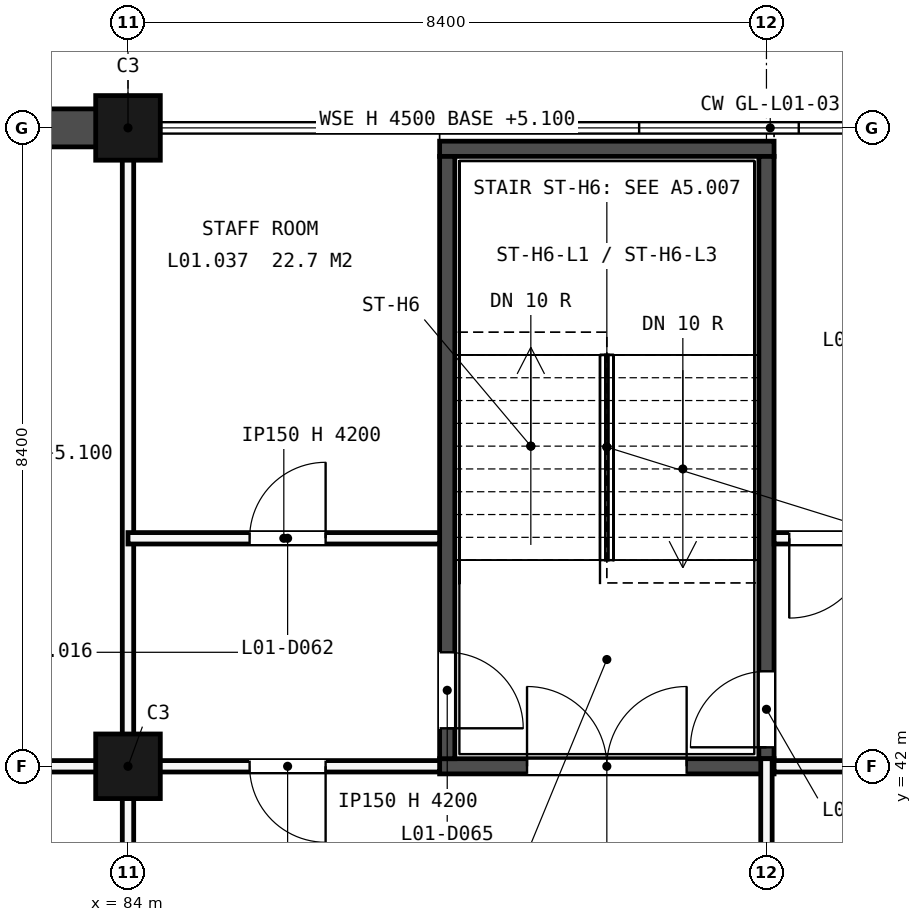
"""IFC4 building model, lengths in metres.
Left out: names, types, materials, properties, quantities, classifications, styles, units other than length and angle.
Written with IfcOpenShell. Run it as: python <this file> out.ifc"""

import sys

from ifc_helpers import new_model, si_unit, direction, frame, frame_2d, origin, origin_2d, place, context, subcontext, project, spatial, rectangle, extrude, element, fill, save


model = new_model("IFC4")
c1 = context("Model", 3, precision=1e-05, world=origin(), true_north=direction((0.0, 1.0)))
c2 = subcontext(c1, "Body", "Model", "MODEL_VIEW")
j1 = project(units=[si_unit("LENGTHUNIT", "METRE"), si_unit("PLANEANGLEUNIT", "RADIAN")], contexts=[c1])
p1 = place(None, origin())
s1 = spatial("IfcSite", under=j1, at=p1, CompositionType="ELEMENT")
p2 = place(p1, origin())
s2 = spatial("IfcBuilding", under=s1, at=p2, CompositionType="ELEMENT")
p3 = place(p2, frame((0.0, 0.0, 5.4)))
s3 = spatial("IfcBuildingStorey", under=s2, at=p3, CompositionType="ELEMENT", Elevation=5.4)
for number, where, z_axis, x_axis in (
    (1, (84.0, 42.0, -0.3), (0.0, 0.0, 1.0), (1.0, 0.0, 0.0)),
    (2, (84.0, 50.4, -0.3), (0.0, 0.0, 1.0), (1.0, 0.0, 0.0)),
):
    element("IfcColumn", number, at=place(p3, frame(where, z_axis=z_axis, x_axis=x_axis)), inside=s3, PredefinedType="COLUMN", context=c2, shape_type="SweptSolid", body=[
        extrude(rectangle(XDim=0.85, YDim=0.85, at=origin_2d()), origin(), (0.0, 0.0, 1.0), 4.55),
    ])
p4 = place(p3, frame((42.0, 50.4, -0.3), z_axis=(0.0, 0.0, 1.0), x_axis=(1.0, 0.0, 0.0)))
e3 = element("IfcWall", 3, at=p4, inside=s3, PredefinedType="SHEAR", context=c2, shape_type="SweptSolid", body=[
    extrude(rectangle(XDim=42.0, YDim=0.5, at=frame_2d((21.0, 0.0))), origin(), (0.0, 0.0, 1.0), 4.55),
])
p5 = place(p3, frame((88.1, 42.0, -0.3), z_axis=(0.0, 0.0, 1.0), x_axis=(1.0, 0.0, 0.0)))
e4 = element("IfcWall", 4, at=p5, inside=s3, PredefinedType="SHEAR", context=c2, shape_type="SweptSolid", body=[
    extrude(rectangle(XDim=4.4, YDim=0.2, at=frame_2d((2.2, 0.0))), origin(), (0.0, 0.0, 1.0), 4.5),
])
p6 = place(p5, frame((1.15, 0.0, 0.3)))
e5 = element("IfcOpeningElement", 5, at=p6, cuts=e4, PredefinedType="OPENING", context=c2, shape_type="SweptSolid", body=[
    extrude(rectangle(XDim=2.1, YDim=2.1, at=frame_2d((1.05, 1.05))), frame((0.0, 0.11, 0.0), z_axis=(0.0, -1.0, 0.0), x_axis=(1.0, 0.0, 0.0)), (0.0, 0.0, 1.0), 0.22),
])
p7 = place(p3, frame((88.1, 50.125, -0.3), z_axis=(0.0, 0.0, 1.0), x_axis=(1.0, 0.0, 0.0)))
e6 = element("IfcWall", 6, at=p7, inside=s3, PredefinedType="SHEAR", context=c2, shape_type="SweptSolid", body=[
    extrude(rectangle(XDim=4.4, YDim=0.2, at=frame_2d((2.2, 0.0))), origin(), (0.0, 0.0, 1.0), 4.5),
])
p8 = place(p3, frame((88.2, 42.1, -0.3), z_axis=(0.0, 0.0, 1.0), x_axis=(0.0, 1.0, 0.0)))
e7 = element("IfcWall", 7, at=p8, inside=s3, PredefinedType="SHEAR", context=c2, shape_type="SweptSolid", body=[
    extrude(rectangle(XDim=7.925, YDim=0.2, at=frame_2d((3.962, 0.0))), origin(), (0.0, 0.0, 1.0), 4.5),
])
p9 = place(p8, frame((0.4, 0.0, 0.3)))
e8 = element("IfcOpeningElement", 8, at=p9, cuts=e7, PredefinedType="OPENING", context=c2, shape_type="SweptSolid", body=[
    extrude(rectangle(XDim=1.0, YDim=2.1, at=frame_2d((0.5, 1.05))), frame((0.0, 0.11, 0.0), z_axis=(0.0, -1.0, 0.0), x_axis=(1.0, 0.0, 0.0)), (0.0, 0.0, 1.0), 0.22),
])
p10 = place(p3, frame((92.4, 42.1, -0.3), z_axis=(0.0, 0.0, 1.0), x_axis=(0.0, 1.0, 0.0)))
e9 = element("IfcWall", 9, at=p10, inside=s3, PredefinedType="SHEAR", context=c2, shape_type="SweptSolid", body=[
    extrude(rectangle(XDim=7.925, YDim=0.2, at=frame_2d((3.962, 0.0))), origin(), (0.0, 0.0, 1.0), 4.5),
])
p11 = place(p10, frame((0.15, 0.0, 0.3)))
e10 = element("IfcOpeningElement", 10, at=p11, cuts=e9, PredefinedType="OPENING", context=c2, shape_type="SweptSolid", body=[
    extrude(rectangle(XDim=1.0, YDim=2.1, at=frame_2d((0.5, 1.05))), frame((0.0, 0.11, 0.0), z_axis=(0.0, -1.0, 0.0), x_axis=(1.0, 0.0, 0.0)), (0.0, 0.0, 1.0), 0.22),
])
p12 = place(p3, frame((42.1, 42.0, -0.3), z_axis=(0.0, 0.0, 1.0), x_axis=(1.0, 0.0, 0.0)))
e11 = element("IfcWall", 11, at=p12, inside=s3, PredefinedType="PARTITIONING", context=c2, shape_type="SweptSolid", body=[
    extrude(rectangle(XDim=41.9, YDim=0.15, at=frame_2d((20.95, 0.0))), origin(), (0.0, 0.0, 1.0), 4.5),
])
p13 = place(p3, frame((84.0, 42.075, -0.3), z_axis=(0.0, 0.0, 1.0), x_axis=(0.0, 1.0, 0.0)))
e12 = element("IfcWall", 12, at=p13, inside=s3, PredefinedType="PARTITIONING", context=c2, shape_type="SweptSolid", body=[
    extrude(rectangle(XDim=8.075, YDim=0.15, at=frame_2d((4.038, 0.0))), origin(), (0.0, 0.0, 1.0), 3.9),
])
p14 = place(p3, frame((83.925, 42.0, 0.0), z_axis=(0.0, 0.0, 1.0), x_axis=(1.0, 0.0, 0.0)))
e13 = element("IfcWall", 13, at=p14, inside=s3, PredefinedType="PARTITIONING", context=c2, shape_type="SweptSolid", body=[
    extrude(rectangle(XDim=4.175, YDim=0.15, at=frame_2d((2.087, 0.0))), origin(), (0.0, 0.0, 1.0), 4.2),
])
p15 = place(p14, frame((1.675, 0.0, 0.0)))
e14 = element("IfcOpeningElement", 14, at=p15, cuts=e13, PredefinedType="OPENING", context=c2, shape_type="SweptSolid", body=[
    extrude(rectangle(XDim=1.0, YDim=2.1, at=frame_2d((0.5, 1.05))), frame((0.0, 0.085, 0.0), z_axis=(0.0, -1.0, 0.0), x_axis=(1.0, 0.0, 0.0)), (0.0, 0.0, 1.0), 0.17),
])
p16 = place(p3, frame((92.5, 42.0, 0.0), z_axis=(0.0, 0.0, 1.0), x_axis=(1.0, 0.0, 0.0)))
e15 = element("IfcWall", 15, at=p16, inside=s3, PredefinedType="PARTITIONING", context=c2, shape_type="SweptSolid", body=[
    extrude(rectangle(XDim=8.605, YDim=0.15, at=frame_2d((4.302, 0.0))), origin(), (0.0, 0.0, 1.0), 4.2),
])
p17 = place(p3, frame((84.0, 45.0, 0.0), z_axis=(0.0, 0.0, 1.0), x_axis=(1.0, 0.0, 0.0)))
e16 = element("IfcWall", 16, at=p17, inside=s3, PredefinedType="PARTITIONING", context=c2, shape_type="SweptSolid", body=[
    extrude(rectangle(XDim=4.1, YDim=0.15, at=frame_2d((2.05, 0.0))), origin(), (0.0, 0.0, 1.0), 4.2),
])
p18 = place(p17, frame((1.6, 0.0, 0.0)))
e17 = element("IfcOpeningElement", 17, at=p18, cuts=e16, PredefinedType="OPENING", context=c2, shape_type="SweptSolid", body=[
    extrude(rectangle(XDim=1.0, YDim=2.1, at=frame_2d((0.5, 1.05))), frame((0.0, 0.085, 0.0), z_axis=(0.0, -1.0, 0.0), x_axis=(1.0, 0.0, 0.0)), (0.0, 0.0, 1.0), 0.17),
])
p19 = place(p3, frame((92.5, 45.0, 0.0), z_axis=(0.0, 0.0, 1.0), x_axis=(1.0, 0.0, 0.0)))
e18 = element("IfcWall", 18, at=p19, inside=s3, PredefinedType="PARTITIONING", context=c2, shape_type="SweptSolid", body=[
    extrude(rectangle(XDim=20.8, YDim=0.15, at=frame_2d((10.4, 0.0))), origin(), (0.0, 0.0, 1.0), 4.2),
])
p20 = place(p19, frame((0.2, 0.0, 0.0)))
e19 = element("IfcOpeningElement", 19, at=p20, cuts=e18, PredefinedType="OPENING", context=c2, shape_type="SweptSolid", body=[
    extrude(rectangle(XDim=2.1, YDim=2.25, at=frame_2d((1.05, 1.125))), frame((0.0, 0.085, 0.0), z_axis=(0.0, -1.0, 0.0), x_axis=(1.0, 0.0, 0.0)), (0.0, 0.0, 1.0), 0.17),
])
p21 = place(p19, frame((18.5, 0.0, 0.0)))
e20 = element("IfcOpeningElement", 20, at=p21, cuts=e18, PredefinedType="OPENING", context=c2, shape_type="SweptSolid", body=[
    extrude(rectangle(XDim=2.1, YDim=2.25, at=frame_2d((1.05, 1.125))), frame((0.0, 0.085, 0.0), z_axis=(0.0, -1.0, 0.0), x_axis=(1.0, 0.0, 0.0)), (0.0, 0.0, 1.0), 0.17),
])
p22 = place(p3, frame((84.0, 37.8, 0.0), z_axis=(0.0, 0.0, 1.0), x_axis=(0.0, 1.0, 0.0)))
e21 = element("IfcWall", 21, at=p22, inside=s3, PredefinedType="PARTITIONING", context=c2, shape_type="SweptSolid", body=[
    extrude(rectangle(XDim=4.125, YDim=0.15, at=frame_2d((2.062, 0.0))), origin(), (0.0, 0.0, 1.0), 3.6),
])
p23 = place(p22, frame((1.4, 0.0, 0.0)))
e22 = element("IfcOpeningElement", 22, at=p23, cuts=e21, PredefinedType="OPENING", context=c2, shape_type="SweptSolid", body=[
    extrude(rectangle(XDim=1.0, YDim=2.1, at=frame_2d((0.5, 1.05))), frame((0.0, 0.085, 0.0), z_axis=(0.0, -1.0, 0.0), x_axis=(1.0, 0.0, 0.0)), (0.0, 0.0, 1.0), 0.17),
])
p24 = place(p3, frame((92.4, 33.295, 0.0), z_axis=(0.0, 0.0, 1.0), x_axis=(0.0, 1.0, 0.0)))
e23 = element("IfcWall", 23, at=p24, inside=s3, PredefinedType="PARTITIONING", context=c2, shape_type="SweptSolid", body=[
    extrude(rectangle(XDim=8.805, YDim=0.15, at=frame_2d((4.403, 0.0))), origin(), (0.0, 0.0, 1.0), 4.2),
])
p25 = place(p6, origin())
e24 = element("IfcDoor", 24, at=p25, inside=s3, OperationType="DOUBLE_DOOR_SINGLE_SWING", PredefinedType="DOOR", context=c2, shape_type="SweptSolid", body=[
    extrude(rectangle(XDim=2.1, YDim=2.1, at=frame_2d((1.05, 1.05))), frame((0.0, 0.025, 0.0), z_axis=(0.0, -1.0, 0.0), x_axis=(1.0, 0.0, 0.0)), (0.0, 0.0, 1.0), 0.05),
])
fill(e5, e24)
p26 = place(p11, origin())
e25 = element("IfcDoor", 25, at=p26, inside=s3, OperationType="SINGLE_SWING_RIGHT", PredefinedType="DOOR", context=c2, shape_type="SweptSolid", body=[
    extrude(rectangle(XDim=1.0, YDim=2.1, at=frame_2d((0.5, 1.05))), frame((0.0, 0.025, 0.0), z_axis=(0.0, -1.0, 0.0), x_axis=(1.0, 0.0, 0.0)), (0.0, 0.0, 1.0), 0.05),
])
fill(e10, e25)
p27 = place(p18, origin())
e26 = element("IfcDoor", 26, at=p27, inside=s3, OperationType="SINGLE_SWING_LEFT", PredefinedType="DOOR", context=c2, shape_type="SweptSolid", body=[
    extrude(rectangle(XDim=1.0, YDim=2.1, at=frame_2d((0.5, 1.05))), frame((0.0, 0.025, 0.0), z_axis=(0.0, -1.0, 0.0), x_axis=(1.0, 0.0, 0.0)), (0.0, 0.0, 1.0), 0.05),
])
fill(e17, e26)
p28 = place(p20, origin())
e27 = element("IfcDoor", 27, at=p28, inside=s3, OperationType="DOUBLE_DOOR_SINGLE_SWING", PredefinedType="DOOR", context=c2, shape_type="SweptSolid", body=[
    extrude(rectangle(XDim=2.1, YDim=2.25, at=frame_2d((1.05, 1.125))), frame((0.0, 0.025, 0.0), z_axis=(0.0, -1.0, 0.0), x_axis=(1.0, 0.0, 0.0)), (0.0, 0.0, 1.0), 0.05),
])
fill(e19, e27)
p29 = place(p15, origin())
e28 = element("IfcDoor", 28, at=p29, inside=s3, OperationType="SINGLE_SWING_RIGHT", PredefinedType="DOOR", context=c2, shape_type="SweptSolid", body=[
    extrude(rectangle(XDim=1.0, YDim=2.1, at=frame_2d((0.5, 1.05))), frame((0.0, 0.025, 0.0), z_axis=(0.0, -1.0, 0.0), x_axis=(1.0, 0.0, 0.0)), (0.0, 0.0, 1.0), 0.05),
])
fill(e14, e28)
p30 = place(p9, origin())
e29 = element("IfcDoor", 29, at=p30, inside=s3, OperationType="SINGLE_SWING_LEFT", PredefinedType="DOOR", context=c2, shape_type="SweptSolid", body=[
    extrude(rectangle(XDim=1.0, YDim=2.1, at=frame_2d((0.5, 1.05))), frame((0.0, 0.025, 0.0), z_axis=(0.0, -1.0, 0.0), x_axis=(1.0, 0.0, 0.0)), (0.0, 0.0, 1.0), 0.05),
])
fill(e8, e29)
save(model, sys.argv[1])
